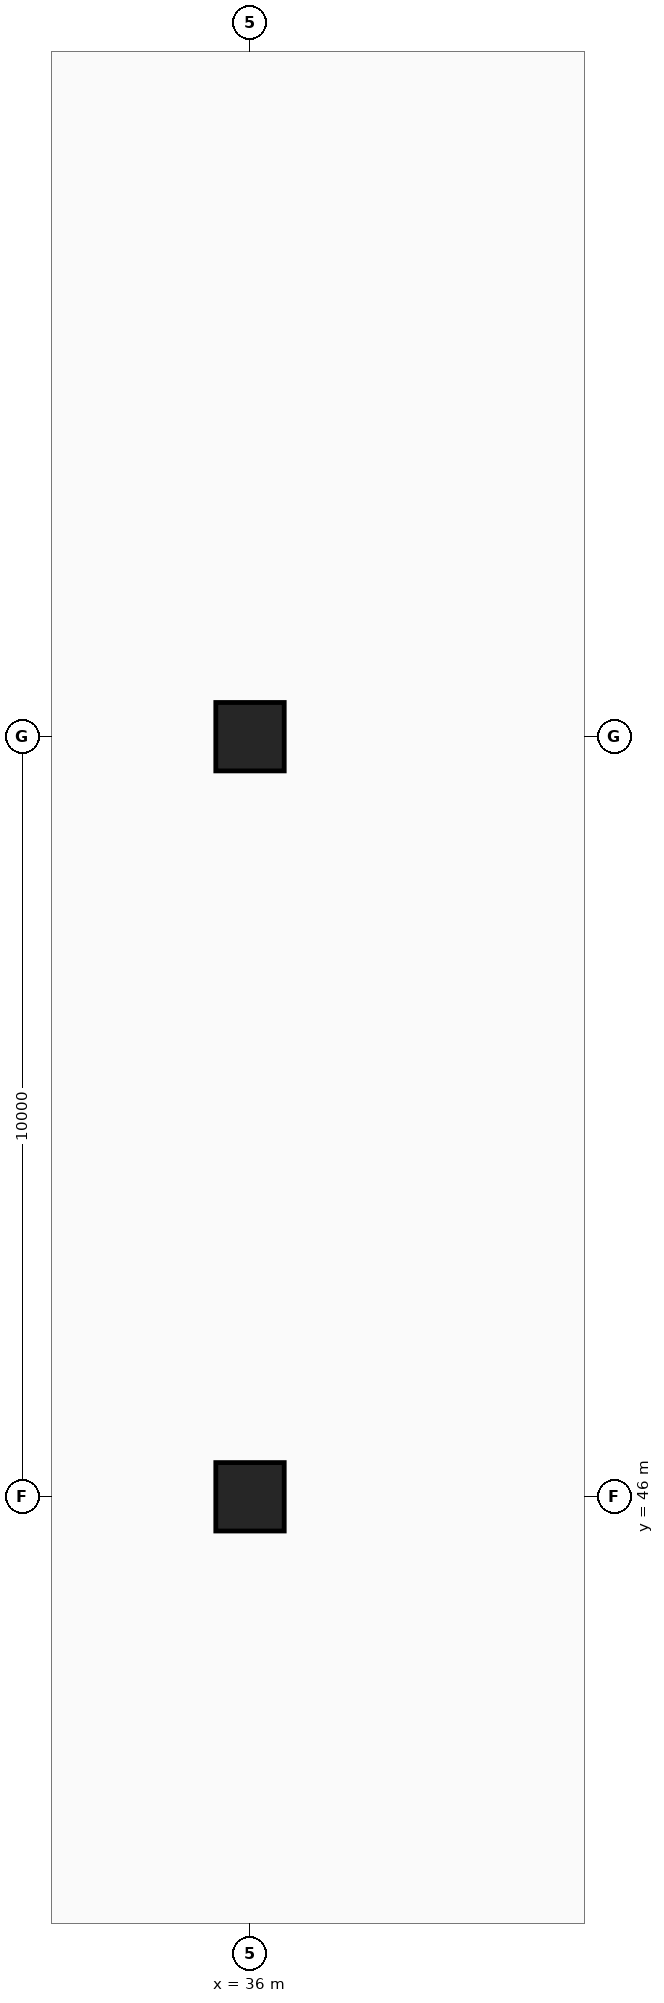
"""IFC4 building model, lengths in metres.
Left out: names, types, materials, properties, quantities, classifications, styles, units other than length and angle.
Written with IfcOpenShell. Run it as: python <this file> out.ifc"""

import sys

from ifc_helpers import new_model, si_unit, direction, frame, origin, origin_2d, place, context, subcontext, project, spatial, rectangle, extrude, element, save


model = new_model("IFC4")
c1 = context("Model", 3, precision=1e-05, world=origin(), true_north=direction((0.0, 1.0)))
c2 = subcontext(c1, "Body", "Model", "MODEL_VIEW")
j1 = project(units=[si_unit("LENGTHUNIT", "METRE"), si_unit("PLANEANGLEUNIT", "RADIAN")], contexts=[c1])
p1 = place(None, origin())
s1 = spatial("IfcSite", under=j1, at=p1, CompositionType="ELEMENT")
p2 = place(p1, origin())
s2 = spatial("IfcBuilding", under=s1, at=p2, CompositionType="ELEMENT")
p3 = place(p2, frame((0.0, 0.0, -5.1)))
s3 = spatial("IfcBuildingStorey", under=s2, at=p3, CompositionType="ELEMENT", Elevation=-5.1)
for number, where, z_axis, x_axis in (
    (1, (36.0, 46.0, 0.0), (0.0, 0.0, 1.0), (1.0, 0.0, 0.0)),
    (2, (36.0, 56.0, 0.0), (0.0, 0.0, 1.0), (1.0, 0.0, 0.0)),
):
    element("IfcColumn", number, at=place(p3, frame(where, z_axis=z_axis, x_axis=x_axis)), inside=s3, PredefinedType="COLUMN", context=c2, shape_type="SweptSolid", body=[
        extrude(rectangle(XDim=0.9, YDim=0.9, at=origin_2d()), origin(), (0.0, 0.0, 1.0), 5.1),
    ])
save(model, sys.argv[1])
